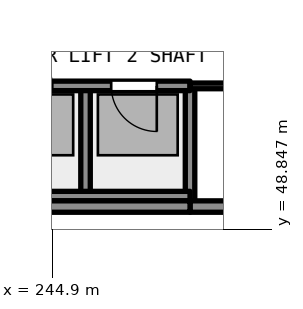
"""IFC4 building model, lengths in metres.
Left out: names, types, materials, properties, quantities, classifications, styles, units other than length and angle.
Written with IfcOpenShell. Run it as: python <this file> out.ifc"""

import sys

from ifc_helpers import new_model, si_unit, direction, frame, frame_2d, origin, place, context, subcontext, project, spatial, rectangle, extrude, element, fill, save


model = new_model("IFC4")
c1 = context("Model", 3, precision=1e-05, world=origin(), true_north=direction((0.0, 1.0)))
c2 = subcontext(c1, "Body", "Model", "MODEL_VIEW")
j1 = project(units=[si_unit("LENGTHUNIT", "METRE"), si_unit("PLANEANGLEUNIT", "RADIAN")], contexts=[c1])
p1 = place(None, origin())
s1 = spatial("IfcSite", under=j1, at=p1, CompositionType="ELEMENT")
p2 = place(p1, origin())
s2 = spatial("IfcBuilding", under=s1, at=p2, CompositionType="ELEMENT")
p3 = place(p2, origin())
s3 = spatial("IfcBuildingStorey", under=s2, at=p3, CompositionType="ELEMENT", Elevation=0.0)
for number, where, z_axis, x_axis in (
    (1, (248.525, 49.6, -1.2), (0.0, 0.0, 1.0), (0.0, 1.0, 0.0)),
    (2, (245.775, 49.6, -1.2), (0.0, 0.0, 1.0), (0.0, 1.0, 0.0)),
):
    element("IfcWall", number, at=place(p3, frame(where, z_axis=z_axis, x_axis=x_axis)), inside=s3, PredefinedType="SHEAR", context=c2, shape_type="SweptSolid", body=[
        extrude(rectangle(XDim=3.025, YDim=0.25, at=frame_2d((1.512, 0.0))), origin(), (0.0, 0.0, 1.0), 26.19),
    ])
p4 = place(p3, frame((237.525, 52.625, -1.2), z_axis=(0.0, 0.0, 1.0), x_axis=(1.0, 0.0, 0.0)))
e3 = element("IfcWall", 3, at=p4, inside=s3, PredefinedType="SHEAR", context=c2, shape_type="SweptSolid", body=[
    extrude(rectangle(XDim=11.0, YDim=0.25, at=frame_2d((5.5, 0.0))), origin(), (0.0, 0.0, 1.0), 26.19),
])
p5 = place(p4, frame((8.925, 0.0, 1.2)))
e4 = element("IfcOpeningElement", 4, at=p5, cuts=e3, PredefinedType="OPENING", context=c2, shape_type="SweptSolid", body=[
    extrude(rectangle(XDim=1.2, YDim=2.1, at=frame_2d((0.6, 1.05))), frame((0.0, 0.135, 0.0), z_axis=(0.0, -1.0, 0.0), x_axis=(1.0, 0.0, 0.0)), (0.0, 0.0, 1.0), 0.271),
])
p6 = place(p4, frame((6.175, 0.0, 1.2)))
e5 = element("IfcOpeningElement", 5, at=p6, cuts=e3, PredefinedType="OPENING", context=c2, shape_type="SweptSolid", body=[
    extrude(rectangle(XDim=1.2, YDim=2.1, at=frame_2d((0.6, 1.05))), frame((0.0, 0.135, 0.0), z_axis=(0.0, -1.0, 0.0), x_axis=(1.0, 0.0, 0.0)), (0.0, 0.0, 1.0), 0.271),
])
p7 = place(p4, frame((3.425, 0.0, 1.2)))
e6 = element("IfcOpeningElement", 6, at=p7, cuts=e3, PredefinedType="OPENING", context=c2, shape_type="SweptSolid", body=[
    extrude(rectangle(XDim=1.2, YDim=2.1, at=frame_2d((0.6, 1.05))), frame((0.0, 0.135, 0.0), z_axis=(0.0, -1.0, 0.0), x_axis=(1.0, 0.0, 0.0)), (0.0, 0.0, 1.0), 0.271),
])
p8 = place(p4, frame((0.675, 0.0, 1.2)))
e7 = element("IfcOpeningElement", 7, at=p8, cuts=e3, PredefinedType="OPENING", context=c2, shape_type="SweptSolid", body=[
    extrude(rectangle(XDim=1.2, YDim=2.1, at=frame_2d((0.6, 1.05))), frame((0.0, 0.135, 0.0), z_axis=(0.0, -1.0, 0.0), x_axis=(1.0, 0.0, 0.0)), (0.0, 0.0, 1.0), 0.271),
])
p9 = place(p4, frame((8.925, 0.0, 10.2)))
e8 = element("IfcOpeningElement", 8, at=p9, cuts=e3, PredefinedType="OPENING", context=c2, shape_type="SweptSolid", body=[
    extrude(rectangle(XDim=1.2, YDim=2.1, at=frame_2d((0.6, 1.05))), frame((0.0, 0.135, 0.0), z_axis=(0.0, -1.0, 0.0), x_axis=(1.0, 0.0, 0.0)), (0.0, 0.0, 1.0), 0.271),
])
p10 = place(p4, frame((6.175, 0.0, 10.2)))
e9 = element("IfcOpeningElement", 9, at=p10, cuts=e3, PredefinedType="OPENING", context=c2, shape_type="SweptSolid", body=[
    extrude(rectangle(XDim=1.2, YDim=2.1, at=frame_2d((0.6, 1.05))), frame((0.0, 0.135, 0.0), z_axis=(0.0, -1.0, 0.0), x_axis=(1.0, 0.0, 0.0)), (0.0, 0.0, 1.0), 0.271),
])
p11 = place(p4, frame((3.425, 0.0, 10.2)))
e10 = element("IfcOpeningElement", 10, at=p11, cuts=e3, PredefinedType="OPENING", context=c2, shape_type="SweptSolid", body=[
    extrude(rectangle(XDim=1.2, YDim=2.1, at=frame_2d((0.6, 1.05))), frame((0.0, 0.135, 0.0), z_axis=(0.0, -1.0, 0.0), x_axis=(1.0, 0.0, 0.0)), (0.0, 0.0, 1.0), 0.271),
])
p12 = place(p4, frame((0.675, 0.0, 10.2)))
e11 = element("IfcOpeningElement", 11, at=p12, cuts=e3, PredefinedType="OPENING", context=c2, shape_type="SweptSolid", body=[
    extrude(rectangle(XDim=1.2, YDim=2.1, at=frame_2d((0.6, 1.05))), frame((0.0, 0.135, 0.0), z_axis=(0.0, -1.0, 0.0), x_axis=(1.0, 0.0, 0.0)), (0.0, 0.0, 1.0), 0.271),
])
p13 = place(p4, frame((8.925, 0.0, 16.2)))
e12 = element("IfcOpeningElement", 12, at=p13, cuts=e3, PredefinedType="OPENING", context=c2, shape_type="SweptSolid", body=[
    extrude(rectangle(XDim=1.2, YDim=2.1, at=frame_2d((0.6, 1.05))), frame((0.0, 0.135, 0.0), z_axis=(0.0, -1.0, 0.0), x_axis=(1.0, 0.0, 0.0)), (0.0, 0.0, 1.0), 0.271),
])
p14 = place(p4, frame((6.175, 0.0, 16.2)))
e13 = element("IfcOpeningElement", 13, at=p14, cuts=e3, PredefinedType="OPENING", context=c2, shape_type="SweptSolid", body=[
    extrude(rectangle(XDim=1.2, YDim=2.1, at=frame_2d((0.6, 1.05))), frame((0.0, 0.135, 0.0), z_axis=(0.0, -1.0, 0.0), x_axis=(1.0, 0.0, 0.0)), (0.0, 0.0, 1.0), 0.271),
])
p15 = place(p4, frame((3.425, 0.0, 16.2)))
e14 = element("IfcOpeningElement", 14, at=p15, cuts=e3, PredefinedType="OPENING", context=c2, shape_type="SweptSolid", body=[
    extrude(rectangle(XDim=1.2, YDim=2.1, at=frame_2d((0.6, 1.05))), frame((0.0, 0.135, 0.0), z_axis=(0.0, -1.0, 0.0), x_axis=(1.0, 0.0, 0.0)), (0.0, 0.0, 1.0), 0.271),
])
p16 = place(p4, frame((0.675, 0.0, 16.2)))
e15 = element("IfcOpeningElement", 15, at=p16, cuts=e3, PredefinedType="OPENING", context=c2, shape_type="SweptSolid", body=[
    extrude(rectangle(XDim=1.2, YDim=2.1, at=frame_2d((0.6, 1.05))), frame((0.0, 0.135, 0.0), z_axis=(0.0, -1.0, 0.0), x_axis=(1.0, 0.0, 0.0)), (0.0, 0.0, 1.0), 0.271),
])
p17 = place(p4, frame((8.925, 0.0, 21.6)))
e16 = element("IfcOpeningElement", 16, at=p17, cuts=e3, PredefinedType="OPENING", context=c2, shape_type="SweptSolid", body=[
    extrude(rectangle(XDim=1.2, YDim=2.1, at=frame_2d((0.6, 1.05))), frame((0.0, 0.135, 0.0), z_axis=(0.0, -1.0, 0.0), x_axis=(1.0, 0.0, 0.0)), (0.0, 0.0, 1.0), 0.271),
])
p18 = place(p4, frame((6.175, 0.0, 21.6)))
e17 = element("IfcOpeningElement", 17, at=p18, cuts=e3, PredefinedType="OPENING", context=c2, shape_type="SweptSolid", body=[
    extrude(rectangle(XDim=1.2, YDim=2.1, at=frame_2d((0.6, 1.05))), frame((0.0, 0.135, 0.0), z_axis=(0.0, -1.0, 0.0), x_axis=(1.0, 0.0, 0.0)), (0.0, 0.0, 1.0), 0.271),
])
p19 = place(p4, frame((3.425, 0.0, 21.6)))
e18 = element("IfcOpeningElement", 18, at=p19, cuts=e3, PredefinedType="OPENING", context=c2, shape_type="SweptSolid", body=[
    extrude(rectangle(XDim=1.2, YDim=2.1, at=frame_2d((0.6, 1.05))), frame((0.0, 0.135, 0.0), z_axis=(0.0, -1.0, 0.0), x_axis=(1.0, 0.0, 0.0)), (0.0, 0.0, 1.0), 0.271),
])
p20 = place(p4, frame((0.675, 0.0, 21.6)))
e19 = element("IfcOpeningElement", 19, at=p20, cuts=e3, PredefinedType="OPENING", context=c2, shape_type="SweptSolid", body=[
    extrude(rectangle(XDim=1.2, YDim=2.1, at=frame_2d((0.6, 1.05))), frame((0.0, 0.135, 0.0), z_axis=(0.0, -1.0, 0.0), x_axis=(1.0, 0.0, 0.0)), (0.0, 0.0, 1.0), 0.271),
])
p21 = place(p3, frame((237.525, 49.725, -1.2), z_axis=(0.0, 0.0, 1.0), x_axis=(1.0, 0.0, 0.0)))
e20 = element("IfcWall", 20, at=p21, inside=s3, PredefinedType="SHEAR", context=c2, shape_type="SweptSolid", body=[
    extrude(rectangle(XDim=11.0, YDim=0.25, at=frame_2d((5.5, 0.0))), origin(), (0.0, 0.0, 1.0), 26.19),
])
p22 = place(p3, frame((248.525, 49.45, 0.0), z_axis=(0.0, 0.0, 1.0), x_axis=(1.0, 0.0, 0.0)))
e21 = element("IfcWall", 21, at=p22, inside=s3, PredefinedType="SOLIDWALL", context=c2, shape_type="SweptSolid", body=[
    extrude(rectangle(XDim=2.725, YDim=0.3, at=frame_2d((1.363, 0.0))), origin(), (0.0, 0.0, 1.0), 8.59),
])
p23 = place(p3, frame((251.1, 52.625, 0.0), z_axis=(0.0, 0.0, 1.0), x_axis=(-1.0, 0.0, 0.0)))
e22 = element("IfcWall", 22, at=p23, inside=s3, PredefinedType="PARTITIONING", context=c2, shape_type="SweptSolid", body=[
    extrude(rectangle(XDim=2.575, YDim=0.15, at=frame_2d((1.288, 0.0))), origin(), (0.0, 0.0, 1.0), 8.59),
])
p24 = place(p23, frame((0.725, 0.0, 0.0)))
e23 = element("IfcOpeningElement", 23, at=p24, cuts=e22, PredefinedType="OPENING", context=c2, shape_type="SweptSolid", body=[
    extrude(rectangle(XDim=0.9, YDim=2.1, at=frame_2d((0.45, 1.05))), frame((0.0, 0.085, 0.0), z_axis=(0.0, -1.0, 0.0), x_axis=(1.0, 0.0, 0.0)), (0.0, 0.0, 1.0), 0.171),
])
p25 = place(p3, frame((237.525, 49.45, 0.0), z_axis=(0.0, 0.0, 1.0), x_axis=(1.0, 0.0, 0.0)))
e24 = element("IfcWall", 24, at=p25, inside=s3, PredefinedType="SOLIDWALL", context=c2, shape_type="SweptSolid", body=[
    extrude(rectangle(XDim=11.0, YDim=0.3, at=frame_2d((5.5, 0.0))), origin(), (0.0, 0.0, 1.0), 8.59),
])
p26 = place(p5, origin())
e25 = element("IfcDoor", 25, at=p26, inside=s3, OperationType="SLIDING_TO_RIGHT", PredefinedType="DOOR", context=c2, shape_type="SweptSolid", body=[
    extrude(rectangle(XDim=1.2, YDim=2.1, at=frame_2d((0.6, 1.05))), frame((0.0, 0.025, 0.0), z_axis=(0.0, -1.0, 0.0), x_axis=(1.0, 0.0, 0.0)), (0.0, 0.0, 1.0), 0.05),
])
fill(e4, e25)
p27 = place(p6, origin())
e26 = element("IfcDoor", 26, at=p27, inside=s3, OperationType="SLIDING_TO_LEFT", PredefinedType="DOOR", context=c2, shape_type="SweptSolid", body=[
    extrude(rectangle(XDim=1.2, YDim=2.1, at=frame_2d((0.6, 1.05))), frame((0.0, 0.025, 0.0), z_axis=(0.0, -1.0, 0.0), x_axis=(1.0, 0.0, 0.0)), (0.0, 0.0, 1.0), 0.05),
])
fill(e5, e26)
save(model, sys.argv[1])
